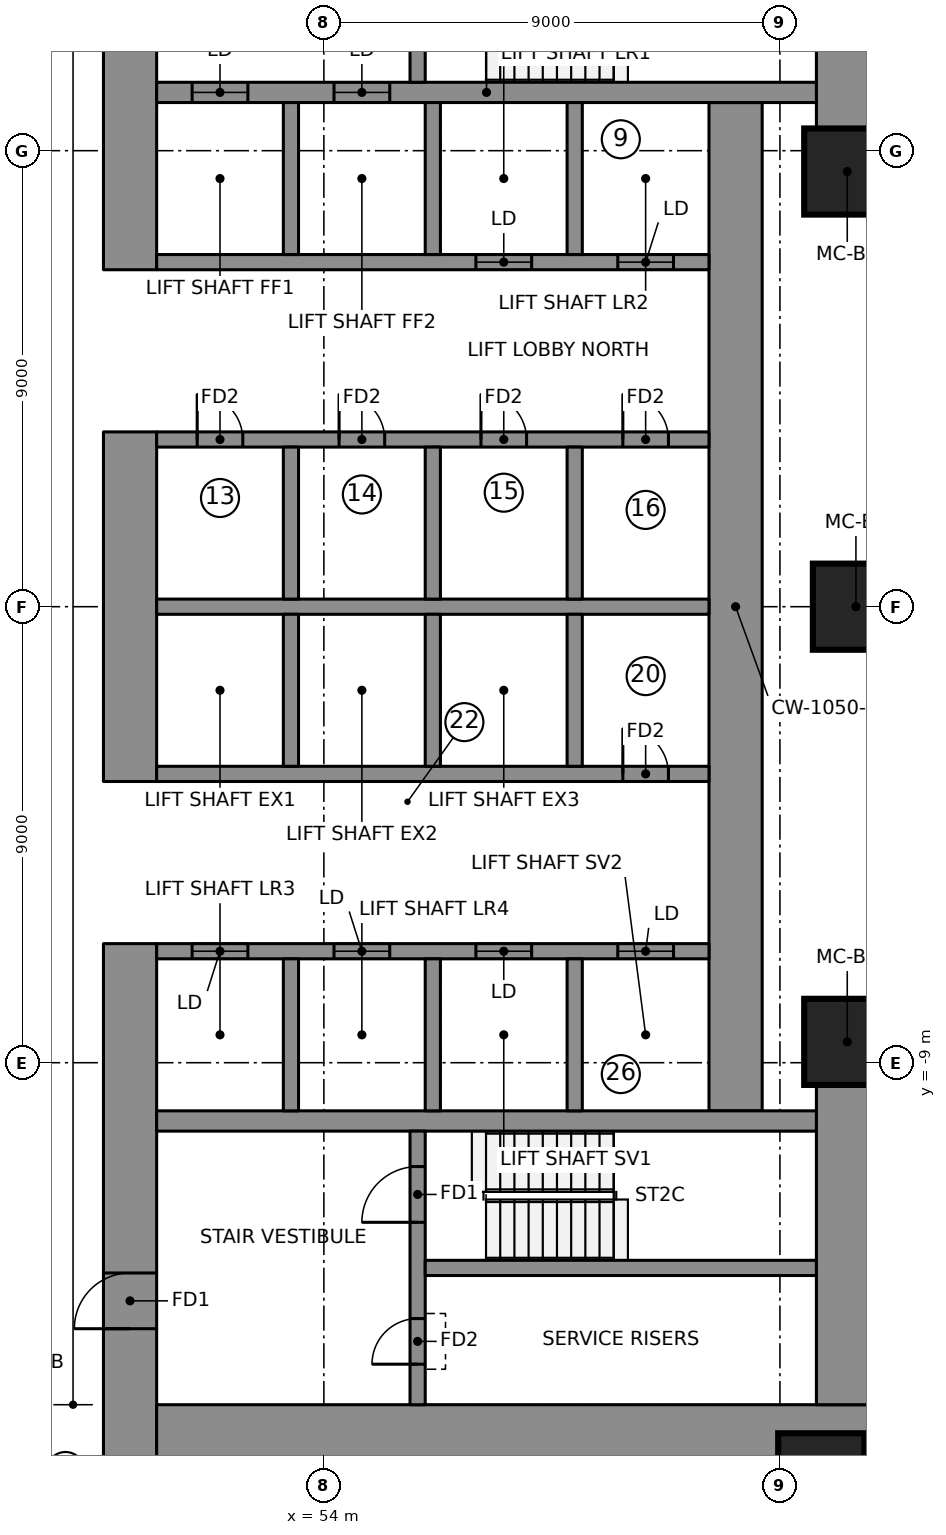
"""IFC4 building model, lengths in metres.
Left out: names, types, materials, properties, quantities, classifications, styles, units other than length and angle.
Written with IfcOpenShell. Run it as: python <this file> out.ifc"""

import sys

from ifc_helpers import new_model, si_unit, direction, frame, frame_2d, origin, origin_2d, place, context, subcontext, project, spatial, rectangle, extrude, element, fill, save


model = new_model("IFC4")
c1 = context("Model", 3, precision=1e-05, world=origin(), true_north=direction((0.0, 1.0)))
c2 = subcontext(c1, "Body", "Model", "MODEL_VIEW")
j1 = project(units=[si_unit("LENGTHUNIT", "METRE"), si_unit("PLANEANGLEUNIT", "RADIAN")], contexts=[c1])
p1 = place(None, origin())
s1 = spatial("IfcSite", under=j1, at=p1, CompositionType="ELEMENT")
p2 = place(p1, origin())
s2 = spatial("IfcBuilding", under=s1, at=p2, CompositionType="ELEMENT")
p3 = place(p2, frame((0.0, 0.0, 106.2)))
s3 = spatial("IfcBuildingStorey", under=s2, at=p3, CompositionType="ELEMENT", Elevation=106.2)
p4 = place(p3, frame((50.175, 6.65, 0.0), z_axis=(0.0, 0.0, 1.0), x_axis=(0.0, 1.0, 0.0)))
e1 = element("IfcWall", 1, at=p4, inside=s3, PredefinedType="SHEAR", context=c2, shape_type="SweptSolid", body=[
    extrude(rectangle(XDim=10.15, YDim=1.05, at=frame_2d((5.075, 0.0))), origin(), (0.0, 0.0, 1.0), 3.55),
])
p5 = place(p4, frame((6.5, 0.0, 0.0)))
e2 = element("IfcOpeningElement", 2, at=p5, cuts=e1, PredefinedType="OPENING", context=c2, shape_type="SweptSolid", body=[
    extrude(rectangle(XDim=1.1, YDim=2.1, at=frame_2d((0.55, 1.05))), frame((0.0, 0.535, 0.0), z_axis=(0.0, -1.0, 0.0), x_axis=(1.0, 0.0, 0.0)), (0.0, 0.0, 1.0), 1.07),
])
p6 = place(p3, frame((50.175, -3.45, 0.0), z_axis=(0.0, 0.0, 1.0), x_axis=(0.0, 1.0, 0.0)))
e3 = element("IfcWall", 3, at=p6, inside=s3, PredefinedType="SHEAR", context=c2, shape_type="SweptSolid", body=[
    extrude(rectangle(XDim=6.9, YDim=1.05, at=frame_2d((3.45, 0.0))), origin(), (0.0, 0.0, 1.0), 3.55),
])
p7 = place(p3, frame((50.175, -16.8, 0.0), z_axis=(0.0, 0.0, 1.0), x_axis=(0.0, 1.0, 0.0)))
e4 = element("IfcWall", 4, at=p7, inside=s3, PredefinedType="SHEAR", context=c2, shape_type="SweptSolid", body=[
    extrude(rectangle(XDim=10.15, YDim=1.05, at=frame_2d((5.075, 0.0))), origin(), (0.0, 0.0, 1.0), 3.55),
])
p8 = place(p7, frame((2.55, 0.0, 0.0)))
e5 = element("IfcOpeningElement", 5, at=p8, cuts=e4, PredefinedType="OPENING", context=c2, shape_type="SweptSolid", body=[
    extrude(rectangle(XDim=1.1, YDim=2.1, at=frame_2d((0.55, 1.05))), frame((0.0, 0.535, 0.0), z_axis=(0.0, -1.0, 0.0), x_axis=(1.0, 0.0, 0.0)), (0.0, 0.0, 1.0), 1.07),
])
p9 = place(p3, frame((50.7, -16.275, 0.0), z_axis=(0.0, 0.0, 1.0), x_axis=(1.0, 0.0, 0.0)))
e6 = element("IfcWall", 6, at=p9, inside=s3, PredefinedType="SHEAR", context=c2, shape_type="SweptSolid", body=[
    extrude(rectangle(XDim=14.07, YDim=1.05, at=frame_2d((7.035, 0.0))), origin(), (0.0, 0.0, 1.0), 3.55),
])
for number, where, z_axis, x_axis in (
    (7, (64.245, 9.389, 0.0), (0.0, 0.0, 1.0), (0.0, 1.0, 0.0)),
    (8, (64.245, -15.75, 0.0), (0.0, 0.0, 1.0), (0.0, 1.0, 0.0)),
):
    element("IfcWall", number, at=place(p3, frame(where, z_axis=z_axis, x_axis=x_axis)), inside=s3, PredefinedType="SHEAR", context=c2, shape_type="SweptSolid", body=[
        extrude(rectangle(XDim=6.361, YDim=1.05, at=frame_2d((3.181, 0.0))), origin(), (0.0, 0.0, 1.0), 3.55),
    ])
p10 = place(p3, frame((62.125, -9.95, 0.0), z_axis=(0.0, 0.0, 1.0), x_axis=(0.0, 1.0, 0.0)))
e9 = element("IfcWall", 9, at=p10, inside=s3, PredefinedType="SHEAR", context=c2, shape_type="SweptSolid", body=[
    extrude(rectangle(XDim=19.9, YDim=1.05, at=frame_2d((9.95, 0.0))), origin(), (0.0, 0.0, 1.0), 3.55),
])
p11 = place(p3, frame((50.7, 10.15, 0.0), z_axis=(0.0, 0.0, 1.0), x_axis=(1.0, 0.0, 0.0)))
e10 = element("IfcWall", 10, at=p11, inside=s3, PredefinedType="SHEAR", context=c2, shape_type="SweptSolid", body=[
    extrude(rectangle(XDim=13.02, YDim=0.4, at=frame_2d((6.51, 0.0))), origin(), (0.0, 0.0, 1.0), 3.55),
])
p12 = place(p11, frame((0.7, 0.0, 0.0)))
e11 = element("IfcOpeningElement", 11, at=p12, cuts=e10, PredefinedType="OPENING", context=c2, shape_type="SweptSolid", body=[
    extrude(rectangle(XDim=1.1, YDim=2.1, at=frame_2d((0.55, 1.05))), frame((0.0, 0.21, 0.0), z_axis=(0.0, -1.0, 0.0), x_axis=(1.0, 0.0, 0.0)), (0.0, 0.0, 1.0), 0.42),
])
p13 = place(p11, frame((3.5, 0.0, 0.0)))
e12 = element("IfcOpeningElement", 12, at=p13, cuts=e10, PredefinedType="OPENING", context=c2, shape_type="SweptSolid", body=[
    extrude(rectangle(XDim=1.1, YDim=2.1, at=frame_2d((0.55, 1.05))), frame((0.0, 0.21, 0.0), z_axis=(0.0, -1.0, 0.0), x_axis=(1.0, 0.0, 0.0)), (0.0, 0.0, 1.0), 0.42),
])
p14 = place(p3, frame((50.7, -10.15, 0.0), z_axis=(0.0, 0.0, 1.0), x_axis=(1.0, 0.0, 0.0)))
e13 = element("IfcWall", 13, at=p14, inside=s3, PredefinedType="SHEAR", context=c2, shape_type="SweptSolid", body=[
    extrude(rectangle(XDim=13.02, YDim=0.4, at=frame_2d((6.51, 0.0))), origin(), (0.0, 0.0, 1.0), 3.55),
])
p15 = place(p3, frame((50.7, 0.0, 0.0), z_axis=(0.0, 0.0, 1.0), x_axis=(1.0, 0.0, 0.0)))
e14 = element("IfcWall", 14, at=p15, inside=s3, PredefinedType="SHEAR", context=c2, shape_type="SweptSolid", body=[
    extrude(rectangle(XDim=10.9, YDim=0.3, at=frame_2d((5.45, 0.0))), origin(), (0.0, 0.0, 1.0), 3.55),
])
p16 = place(p3, frame((50.7, 3.3, 0.0), z_axis=(0.0, 0.0, 1.0), x_axis=(1.0, 0.0, 0.0)))
e15 = element("IfcWall", 15, at=p16, inside=s3, PredefinedType="SHEAR", context=c2, shape_type="SweptSolid", body=[
    extrude(rectangle(XDim=10.9, YDim=0.3, at=frame_2d((5.45, 0.0))), origin(), (0.0, 0.0, 1.0), 3.55),
])
p17 = place(p16, frame((0.8, 0.0, 0.0)))
e16 = element("IfcOpeningElement", 16, at=p17, cuts=e15, PredefinedType="OPENING", context=c2, shape_type="SweptSolid", body=[
    extrude(rectangle(XDim=0.9, YDim=2.1, at=frame_2d((0.45, 1.05))), frame((0.0, 0.16, 0.0), z_axis=(0.0, -1.0, 0.0), x_axis=(1.0, 0.0, 0.0)), (0.0, 0.0, 1.0), 0.32),
])
p18 = place(p16, frame((3.6, 0.0, 0.0)))
e17 = element("IfcOpeningElement", 17, at=p18, cuts=e15, PredefinedType="OPENING", context=c2, shape_type="SweptSolid", body=[
    extrude(rectangle(XDim=0.9, YDim=2.1, at=frame_2d((0.45, 1.05))), frame((0.0, 0.16, 0.0), z_axis=(0.0, -1.0, 0.0), x_axis=(1.0, 0.0, 0.0)), (0.0, 0.0, 1.0), 0.32),
])
p19 = place(p16, frame((6.4, 0.0, 0.0)))
e18 = element("IfcOpeningElement", 18, at=p19, cuts=e15, PredefinedType="OPENING", context=c2, shape_type="SweptSolid", body=[
    extrude(rectangle(XDim=0.9, YDim=2.1, at=frame_2d((0.45, 1.05))), frame((0.0, 0.16, 0.0), z_axis=(0.0, -1.0, 0.0), x_axis=(1.0, 0.0, 0.0)), (0.0, 0.0, 1.0), 0.32),
])
p20 = place(p16, frame((9.2, 0.0, 0.0)))
e19 = element("IfcOpeningElement", 19, at=p20, cuts=e15, PredefinedType="OPENING", context=c2, shape_type="SweptSolid", body=[
    extrude(rectangle(XDim=0.9, YDim=2.1, at=frame_2d((0.45, 1.05))), frame((0.0, 0.16, 0.0), z_axis=(0.0, -1.0, 0.0), x_axis=(1.0, 0.0, 0.0)), (0.0, 0.0, 1.0), 0.32),
])
p21 = place(p3, frame((50.7, 6.8, 0.0), z_axis=(0.0, 0.0, 1.0), x_axis=(1.0, 0.0, 0.0)))
e20 = element("IfcWall", 20, at=p21, inside=s3, PredefinedType="SHEAR", context=c2, shape_type="SweptSolid", body=[
    extrude(rectangle(XDim=10.9, YDim=0.3, at=frame_2d((5.45, 0.0))), origin(), (0.0, 0.0, 1.0), 3.55),
])
p22 = place(p21, frame((6.3, 0.0, 0.0)))
e21 = element("IfcOpeningElement", 21, at=p22, cuts=e20, PredefinedType="OPENING", context=c2, shape_type="SweptSolid", body=[
    extrude(rectangle(XDim=1.1, YDim=2.1, at=frame_2d((0.55, 1.05))), frame((0.0, 0.16, 0.0), z_axis=(0.0, -1.0, 0.0), x_axis=(1.0, 0.0, 0.0)), (0.0, 0.0, 1.0), 0.32),
])
p23 = place(p21, frame((9.1, 0.0, 0.0)))
e22 = element("IfcOpeningElement", 22, at=p23, cuts=e20, PredefinedType="OPENING", context=c2, shape_type="SweptSolid", body=[
    extrude(rectangle(XDim=1.1, YDim=2.1, at=frame_2d((0.55, 1.05))), frame((0.0, 0.16, 0.0), z_axis=(0.0, -1.0, 0.0), x_axis=(1.0, 0.0, 0.0)), (0.0, 0.0, 1.0), 0.32),
])
for number, where, z_axis, x_axis in (
    (23, (53.35, 0.15, 0.0), (0.0, 0.0, 1.0), (0.0, 1.0, 0.0)),
    (24, (53.35, 6.95, 0.0), (0.0, 0.0, 1.0), (0.0, 1.0, 0.0)),
    (25, (56.15, 0.15, 0.0), (0.0, 0.0, 1.0), (0.0, 1.0, 0.0)),
    (26, (56.15, 6.95, 0.0), (0.0, 0.0, 1.0), (0.0, 1.0, 0.0)),
    (27, (58.95, 0.15, 0.0), (0.0, 0.0, 1.0), (0.0, 1.0, 0.0)),
    (28, (58.95, 6.95, 0.0), (0.0, 0.0, 1.0), (0.0, 1.0, 0.0)),
):
    element("IfcWall", number, at=place(p3, frame(where, z_axis=z_axis, x_axis=x_axis)), inside=s3, PredefinedType="SHEAR", context=c2, shape_type="SweptSolid", body=[
        extrude(rectangle(XDim=3.0, YDim=0.3, at=frame_2d((1.5, 0.0))), origin(), (0.0, 0.0, 1.0), 3.55),
    ])
p24 = place(p3, frame((50.7, -3.3, 0.0), z_axis=(0.0, 0.0, 1.0), x_axis=(1.0, 0.0, 0.0)))
e29 = element("IfcWall", 29, at=p24, inside=s3, PredefinedType="SHEAR", context=c2, shape_type="SweptSolid", body=[
    extrude(rectangle(XDim=10.9, YDim=0.3, at=frame_2d((5.45, 0.0))), origin(), (0.0, 0.0, 1.0), 3.55),
])
p25 = place(p24, frame((9.2, 0.0, 0.0)))
e30 = element("IfcOpeningElement", 30, at=p25, cuts=e29, PredefinedType="OPENING", context=c2, shape_type="SweptSolid", body=[
    extrude(rectangle(XDim=0.9, YDim=2.1, at=frame_2d((0.45, 1.05))), frame((0.0, 0.16, 0.0), z_axis=(0.0, -1.0, 0.0), x_axis=(1.0, 0.0, 0.0)), (0.0, 0.0, 1.0), 0.32),
])
p26 = place(p3, frame((50.7, -6.8, 0.0), z_axis=(0.0, 0.0, 1.0), x_axis=(1.0, 0.0, 0.0)))
e31 = element("IfcWall", 31, at=p26, inside=s3, PredefinedType="SHEAR", context=c2, shape_type="SweptSolid", body=[
    extrude(rectangle(XDim=10.9, YDim=0.3, at=frame_2d((5.45, 0.0))), origin(), (0.0, 0.0, 1.0), 3.55),
])
p27 = place(p26, frame((0.7, 0.0, 0.0)))
e32 = element("IfcOpeningElement", 32, at=p27, cuts=e31, PredefinedType="OPENING", context=c2, shape_type="SweptSolid", body=[
    extrude(rectangle(XDim=1.1, YDim=2.1, at=frame_2d((0.55, 1.05))), frame((0.0, 0.16, 0.0), z_axis=(0.0, -1.0, 0.0), x_axis=(1.0, 0.0, 0.0)), (0.0, 0.0, 1.0), 0.32),
])
p28 = place(p26, frame((3.5, 0.0, 0.0)))
e33 = element("IfcOpeningElement", 33, at=p28, cuts=e31, PredefinedType="OPENING", context=c2, shape_type="SweptSolid", body=[
    extrude(rectangle(XDim=1.1, YDim=2.1, at=frame_2d((0.55, 1.05))), frame((0.0, 0.16, 0.0), z_axis=(0.0, -1.0, 0.0), x_axis=(1.0, 0.0, 0.0)), (0.0, 0.0, 1.0), 0.32),
])
p29 = place(p26, frame((6.3, 0.0, 0.0)))
e34 = element("IfcOpeningElement", 34, at=p29, cuts=e31, PredefinedType="OPENING", context=c2, shape_type="SweptSolid", body=[
    extrude(rectangle(XDim=1.1, YDim=2.1, at=frame_2d((0.55, 1.05))), frame((0.0, 0.16, 0.0), z_axis=(0.0, -1.0, 0.0), x_axis=(1.0, 0.0, 0.0)), (0.0, 0.0, 1.0), 0.32),
])
p30 = place(p26, frame((9.1, 0.0, 0.0)))
e35 = element("IfcOpeningElement", 35, at=p30, cuts=e31, PredefinedType="OPENING", context=c2, shape_type="SweptSolid", body=[
    extrude(rectangle(XDim=1.1, YDim=2.1, at=frame_2d((0.55, 1.05))), frame((0.0, 0.16, 0.0), z_axis=(0.0, -1.0, 0.0), x_axis=(1.0, 0.0, 0.0)), (0.0, 0.0, 1.0), 0.32),
])
for number, where, z_axis, x_axis in (
    (36, (53.35, -3.15, 0.0), (0.0, 0.0, 1.0), (0.0, 1.0, 0.0)),
    (37, (53.35, -9.95, 0.0), (0.0, 0.0, 1.0), (0.0, 1.0, 0.0)),
    (38, (56.15, -3.15, 0.0), (0.0, 0.0, 1.0), (0.0, 1.0, 0.0)),
    (39, (56.15, -9.95, 0.0), (0.0, 0.0, 1.0), (0.0, 1.0, 0.0)),
    (40, (58.95, -3.15, 0.0), (0.0, 0.0, 1.0), (0.0, 1.0, 0.0)),
    (41, (58.95, -9.95, 0.0), (0.0, 0.0, 1.0), (0.0, 1.0, 0.0)),
):
    element("IfcWall", number, at=place(p3, frame(where, z_axis=z_axis, x_axis=x_axis)), inside=s3, PredefinedType="SHEAR", context=c2, shape_type="SweptSolid", body=[
        extrude(rectangle(XDim=3.0, YDim=0.3, at=frame_2d((1.5, 0.0))), origin(), (0.0, 0.0, 1.0), 3.55),
    ])
p31 = place(p3, frame((55.85, 10.35, 0.0), z_axis=(0.0, 0.0, 1.0), x_axis=(0.0, 1.0, 0.0)))
e42 = element("IfcWall", 42, at=p31, inside=s3, PredefinedType="SHEAR", context=c2, shape_type="SweptSolid", body=[
    extrude(rectangle(XDim=5.4, YDim=0.3, at=frame_2d((2.7, 0.0))), origin(), (0.0, 0.0, 1.0), 3.55),
])
p32 = place(p31, frame((1.43, 0.0, 0.0)))
e43 = element("IfcOpeningElement", 43, at=p32, cuts=e42, PredefinedType="OPENING", context=c2, shape_type="SweptSolid", body=[
    extrude(rectangle(XDim=1.1, YDim=2.1, at=frame_2d((0.55, 1.05))), frame((0.0, 0.16, 0.0), z_axis=(0.0, -1.0, 0.0), x_axis=(1.0, 0.0, 0.0)), (0.0, 0.0, 1.0), 0.32),
])
p33 = place(p31, frame((3.6, 0.0, 0.0)))
e44 = element("IfcOpeningElement", 44, at=p33, cuts=e42, PredefinedType="OPENING", context=c2, shape_type="SweptSolid", body=[
    extrude(rectangle(XDim=1.1, YDim=2.1, at=frame_2d((0.55, 1.05))), frame((0.0, 0.16, 0.0), z_axis=(0.0, -1.0, 0.0), x_axis=(1.0, 0.0, 0.0)), (0.0, 0.0, 1.0), 0.32),
])
p34 = place(p3, frame((55.85, -15.75, 0.0), z_axis=(0.0, 0.0, 1.0), x_axis=(0.0, 1.0, 0.0)))
e45 = element("IfcWall", 45, at=p34, inside=s3, PredefinedType="SHEAR", context=c2, shape_type="SweptSolid", body=[
    extrude(rectangle(XDim=5.4, YDim=0.3, at=frame_2d((2.7, 0.0))), origin(), (0.0, 0.0, 1.0), 3.55),
])
p35 = place(p34, frame((3.6, 0.0, 0.0)))
e46 = element("IfcOpeningElement", 46, at=p35, cuts=e45, PredefinedType="OPENING", context=c2, shape_type="SweptSolid", body=[
    extrude(rectangle(XDim=1.1, YDim=2.1, at=frame_2d((0.55, 1.05))), frame((0.0, 0.16, 0.0), z_axis=(0.0, -1.0, 0.0), x_axis=(1.0, 0.0, 0.0)), (0.0, 0.0, 1.0), 0.32),
])
p36 = place(p34, frame((0.8, 0.0, 0.0)))
e47 = element("IfcOpeningElement", 47, at=p36, cuts=e45, PredefinedType="OPENING", context=c2, shape_type="SweptSolid", body=[
    extrude(rectangle(XDim=0.9, YDim=2.1, at=frame_2d((0.45, 1.05))), frame((0.0, 0.16, 0.0), z_axis=(0.0, -1.0, 0.0), x_axis=(1.0, 0.0, 0.0)), (0.0, 0.0, 1.0), 0.32),
])
p37 = place(p3, frame((56.0, -13.05, 0.0), z_axis=(0.0, 0.0, 1.0), x_axis=(1.0, 0.0, 0.0)))
e48 = element("IfcWall", 48, at=p37, inside=s3, PredefinedType="SHEAR", context=c2, shape_type="SweptSolid", body=[
    extrude(rectangle(XDim=7.72, YDim=0.3, at=frame_2d((3.86, 0.0))), origin(), (0.0, 0.0, 1.0), 3.55),
])
for number, where, z_axis, x_axis in (
    (49, (63.816, -17.164, 0.0), (0.0, 0.0, 1.0), (1.0, 0.0, 0.0)),
    (50, (64.329, -8.589, 0.0), (0.0, 0.0, 1.0), (1.0, 0.0, 0.0)),
    (51, (64.5, 0.0, 0.0), (0.0, 0.0, 1.0), (1.0, 0.0, 0.0)),
    (52, (64.329, 8.589, 0.0), (0.0, 0.0, 1.0), (1.0, 0.0, 0.0)),
):
    element("IfcColumn", number, at=place(p3, frame(where, z_axis=z_axis, x_axis=x_axis)), inside=s3, PredefinedType="COLUMN", context=c2, shape_type="SweptSolid", body=[
        extrude(rectangle(XDim=1.7, YDim=1.7, at=origin_2d()), origin(), (0.0, 0.0, 1.0), 3.55),
    ])
p38 = place(p12, origin())
e53 = element("IfcDoor", 53, at=p38, inside=s3, OperationType="DOUBLE_DOOR_SLIDING", PredefinedType="DOOR", context=c2, shape_type="SweptSolid", body=[
    extrude(rectangle(XDim=1.1, YDim=2.1, at=frame_2d((0.55, 1.05))), frame((0.0, 0.025, 0.0), z_axis=(0.0, -1.0, 0.0), x_axis=(1.0, 0.0, 0.0)), (0.0, 0.0, 1.0), 0.05),
])
fill(e11, e53)
p39 = place(p13, origin())
e54 = element("IfcDoor", 54, at=p39, inside=s3, OperationType="DOUBLE_DOOR_SLIDING", PredefinedType="DOOR", context=c2, shape_type="SweptSolid", body=[
    extrude(rectangle(XDim=1.1, YDim=2.1, at=frame_2d((0.55, 1.05))), frame((0.0, 0.025, 0.0), z_axis=(0.0, -1.0, 0.0), x_axis=(1.0, 0.0, 0.0)), (0.0, 0.0, 1.0), 0.05),
])
fill(e12, e54)
p40 = place(p22, origin())
e55 = element("IfcDoor", 55, at=p40, inside=s3, OperationType="DOUBLE_DOOR_SLIDING", PredefinedType="DOOR", context=c2, shape_type="SweptSolid", body=[
    extrude(rectangle(XDim=1.1, YDim=2.1, at=frame_2d((0.55, 1.05))), frame((0.0, 0.025, 0.0), z_axis=(0.0, -1.0, 0.0), x_axis=(1.0, 0.0, 0.0)), (0.0, 0.0, 1.0), 0.05),
])
fill(e21, e55)
p41 = place(p23, origin())
e56 = element("IfcDoor", 56, at=p41, inside=s3, OperationType="DOUBLE_DOOR_SLIDING", PredefinedType="DOOR", context=c2, shape_type="SweptSolid", body=[
    extrude(rectangle(XDim=1.1, YDim=2.1, at=frame_2d((0.55, 1.05))), frame((0.0, 0.025, 0.0), z_axis=(0.0, -1.0, 0.0), x_axis=(1.0, 0.0, 0.0)), (0.0, 0.0, 1.0), 0.05),
])
fill(e22, e56)
p42 = place(p27, origin())
e57 = element("IfcDoor", 57, at=p42, inside=s3, OperationType="DOUBLE_DOOR_SLIDING", PredefinedType="DOOR", context=c2, shape_type="SweptSolid", body=[
    extrude(rectangle(XDim=1.1, YDim=2.1, at=frame_2d((0.55, 1.05))), frame((0.0, 0.025, 0.0), z_axis=(0.0, -1.0, 0.0), x_axis=(1.0, 0.0, 0.0)), (0.0, 0.0, 1.0), 0.05),
])
fill(e32, e57)
p43 = place(p28, origin())
e58 = element("IfcDoor", 58, at=p43, inside=s3, OperationType="DOUBLE_DOOR_SLIDING", PredefinedType="DOOR", context=c2, shape_type="SweptSolid", body=[
    extrude(rectangle(XDim=1.1, YDim=2.1, at=frame_2d((0.55, 1.05))), frame((0.0, 0.025, 0.0), z_axis=(0.0, -1.0, 0.0), x_axis=(1.0, 0.0, 0.0)), (0.0, 0.0, 1.0), 0.05),
])
fill(e33, e58)
p44 = place(p29, origin())
e59 = element("IfcDoor", 59, at=p44, inside=s3, OperationType="DOUBLE_DOOR_SLIDING", PredefinedType="DOOR", context=c2, shape_type="SweptSolid", body=[
    extrude(rectangle(XDim=1.1, YDim=2.1, at=frame_2d((0.55, 1.05))), frame((0.0, 0.025, 0.0), z_axis=(0.0, -1.0, 0.0), x_axis=(1.0, 0.0, 0.0)), (0.0, 0.0, 1.0), 0.05),
])
fill(e34, e59)
p45 = place(p30, origin())
e60 = element("IfcDoor", 60, at=p45, inside=s3, OperationType="DOUBLE_DOOR_SLIDING", PredefinedType="DOOR", context=c2, shape_type="SweptSolid", body=[
    extrude(rectangle(XDim=1.1, YDim=2.1, at=frame_2d((0.55, 1.05))), frame((0.0, 0.025, 0.0), z_axis=(0.0, -1.0, 0.0), x_axis=(1.0, 0.0, 0.0)), (0.0, 0.0, 1.0), 0.05),
])
fill(e35, e60)
p46 = place(p35, origin())
e61 = element("IfcDoor", 61, at=p46, inside=s3, OperationType="SINGLE_SWING_RIGHT", PredefinedType="DOOR", context=c2, shape_type="SweptSolid", body=[
    extrude(rectangle(XDim=1.1, YDim=2.1, at=frame_2d((0.55, 1.05))), frame((0.0, 0.025, 0.0), z_axis=(0.0, -1.0, 0.0), x_axis=(1.0, 0.0, 0.0)), (0.0, 0.0, 1.0), 0.05),
])
fill(e46, e61)
p47 = place(p8, origin())
e62 = element("IfcDoor", 62, at=p47, inside=s3, OperationType="SINGLE_SWING_RIGHT", PredefinedType="DOOR", context=c2, shape_type="SweptSolid", body=[
    extrude(rectangle(XDim=1.1, YDim=2.1, at=frame_2d((0.55, 1.05))), frame((0.0, 0.025, 0.0), z_axis=(0.0, -1.0, 0.0), x_axis=(1.0, 0.0, 0.0)), (0.0, 0.0, 1.0), 0.05),
])
fill(e5, e62)
p48 = place(p36, origin())
e63 = element("IfcDoor", 63, at=p48, inside=s3, OperationType="SINGLE_SWING_LEFT", PredefinedType="DOOR", context=c2, shape_type="SweptSolid", body=[
    extrude(rectangle(XDim=0.9, YDim=2.1, at=frame_2d((0.45, 1.05))), frame((0.0, 0.025, 0.0), z_axis=(0.0, -1.0, 0.0), x_axis=(1.0, 0.0, 0.0)), (0.0, 0.0, 1.0), 0.05),
])
fill(e47, e63)
p49 = place(p17, origin())
e64 = element("IfcDoor", 64, at=p49, inside=s3, OperationType="SINGLE_SWING_LEFT", PredefinedType="DOOR", context=c2, shape_type="SweptSolid", body=[
    extrude(rectangle(XDim=0.9, YDim=2.1, at=frame_2d((0.45, 1.05))), frame((0.0, 0.025, 0.0), z_axis=(0.0, -1.0, 0.0), x_axis=(1.0, 0.0, 0.0)), (0.0, 0.0, 1.0), 0.05),
])
fill(e16, e64)
p50 = place(p18, origin())
e65 = element("IfcDoor", 65, at=p50, inside=s3, OperationType="SINGLE_SWING_LEFT", PredefinedType="DOOR", context=c2, shape_type="SweptSolid", body=[
    extrude(rectangle(XDim=0.9, YDim=2.1, at=frame_2d((0.45, 1.05))), frame((0.0, 0.025, 0.0), z_axis=(0.0, -1.0, 0.0), x_axis=(1.0, 0.0, 0.0)), (0.0, 0.0, 1.0), 0.05),
])
fill(e17, e65)
p51 = place(p19, origin())
e66 = element("IfcDoor", 66, at=p51, inside=s3, OperationType="SINGLE_SWING_LEFT", PredefinedType="DOOR", context=c2, shape_type="SweptSolid", body=[
    extrude(rectangle(XDim=0.9, YDim=2.1, at=frame_2d((0.45, 1.05))), frame((0.0, 0.025, 0.0), z_axis=(0.0, -1.0, 0.0), x_axis=(1.0, 0.0, 0.0)), (0.0, 0.0, 1.0), 0.05),
])
fill(e18, e66)
p52 = place(p20, origin())
e67 = element("IfcDoor", 67, at=p52, inside=s3, OperationType="SINGLE_SWING_LEFT", PredefinedType="DOOR", context=c2, shape_type="SweptSolid", body=[
    extrude(rectangle(XDim=0.9, YDim=2.1, at=frame_2d((0.45, 1.05))), frame((0.0, 0.025, 0.0), z_axis=(0.0, -1.0, 0.0), x_axis=(1.0, 0.0, 0.0)), (0.0, 0.0, 1.0), 0.05),
])
fill(e19, e67)
p53 = place(p25, origin())
e68 = element("IfcDoor", 68, at=p53, inside=s3, OperationType="SINGLE_SWING_LEFT", PredefinedType="DOOR", context=c2, shape_type="SweptSolid", body=[
    extrude(rectangle(XDim=0.9, YDim=2.1, at=frame_2d((0.45, 1.05))), frame((0.0, 0.025, 0.0), z_axis=(0.0, -1.0, 0.0), x_axis=(1.0, 0.0, 0.0)), (0.0, 0.0, 1.0), 0.05),
])
fill(e30, e68)
save(model, sys.argv[1])
